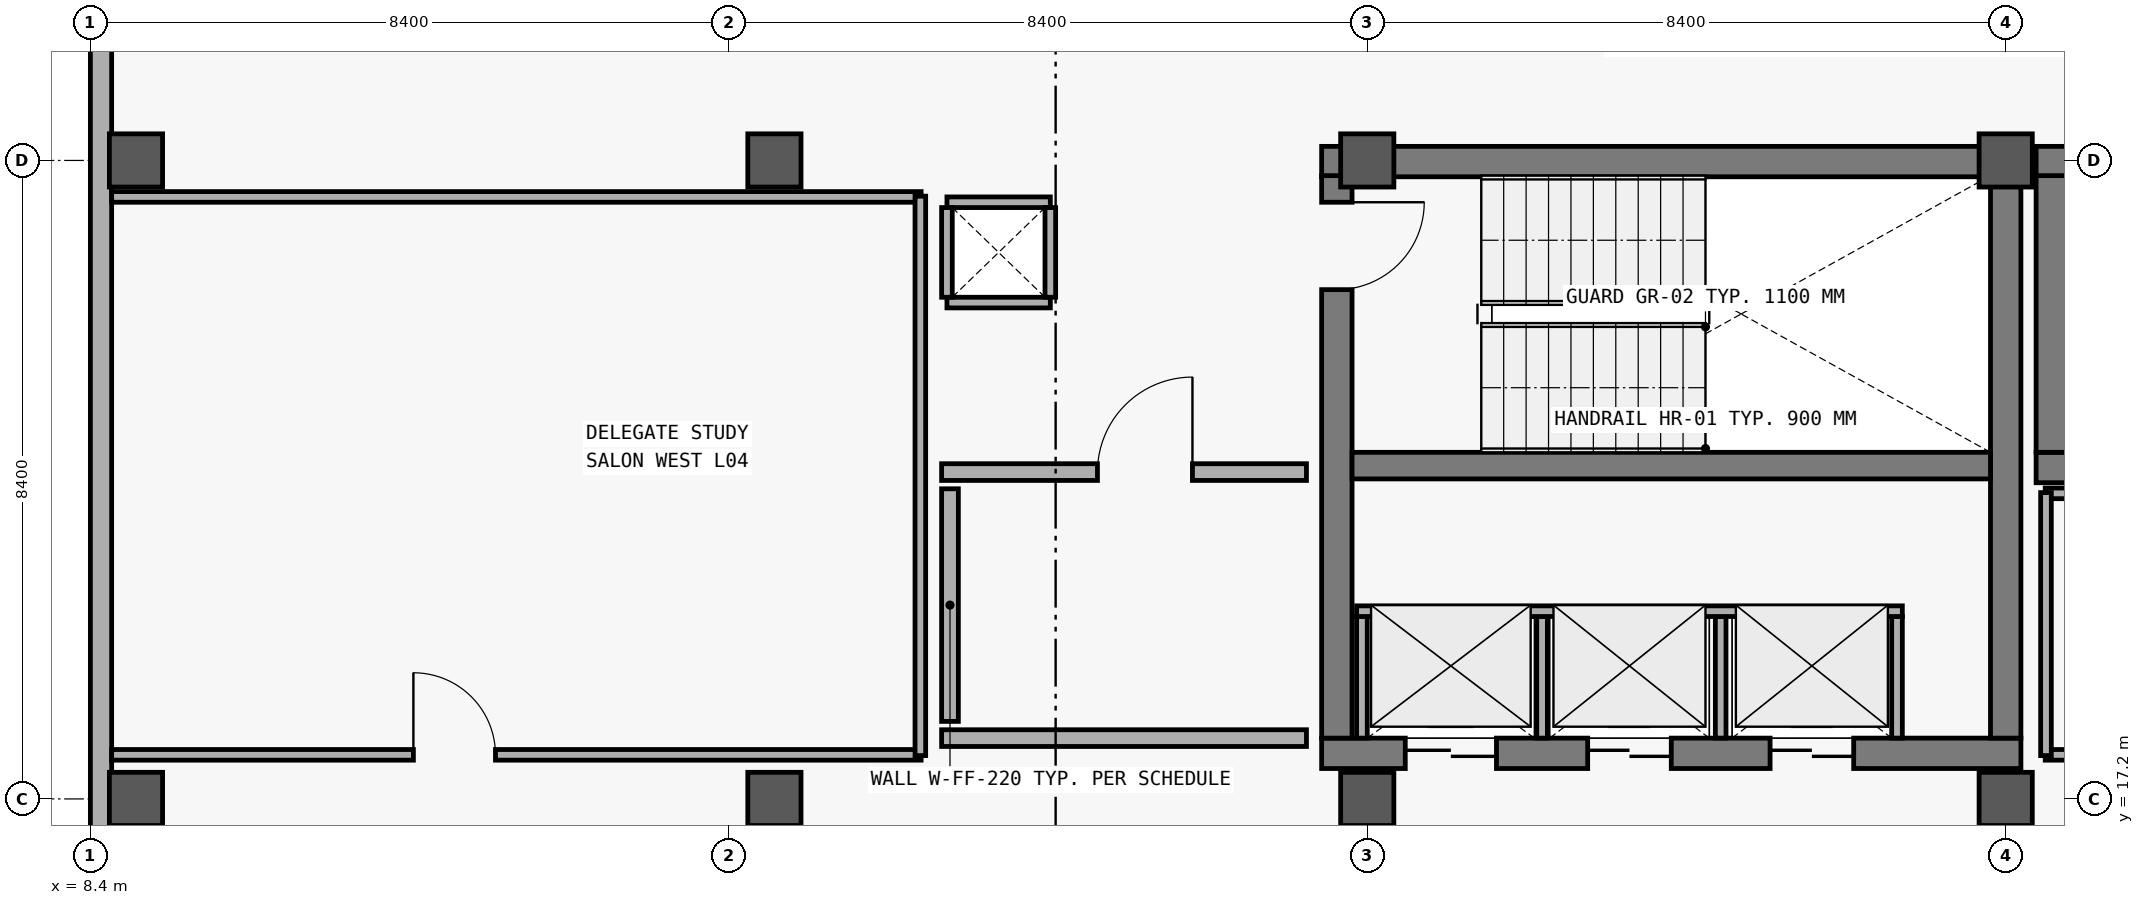
"""IFC4 building model, lengths in metres.
Left out: names, types, materials, properties, quantities, classifications, styles, units other than length and angle.
Written with IfcOpenShell. Run it as: python <this file> out.ifc"""

import sys

from ifc_helpers import new_model, si_unit, direction, frame, frame_2d, origin, origin_2d, place, context, subcontext, project, spatial, rectangle, extrude, element, fill, save


model = new_model("IFC4")
c1 = context("Model", 3, precision=1e-05, world=origin(), true_north=direction((0.0, 1.0)))
c2 = subcontext(c1, "Body", "Model", "MODEL_VIEW")
j1 = project(units=[si_unit("LENGTHUNIT", "METRE"), si_unit("PLANEANGLEUNIT", "RADIAN")], contexts=[c1])
p1 = place(None, origin())
s1 = spatial("IfcSite", under=j1, at=p1, CompositionType="ELEMENT")
p2 = place(p1, origin())
s2 = spatial("IfcBuilding", under=s1, at=p2, CompositionType="ELEMENT")
p3 = place(p2, frame((0.0, 0.0, 19.2)))
s3 = spatial("IfcBuildingStorey", under=s2, at=p3, CompositionType="ELEMENT", Elevation=19.2)
for number, where, z_axis, x_axis in (
    (1, (9.0, 17.2, 0.0), (0.0, 0.0, 1.0), (1.0, 0.0, 0.0)),
    (2, (9.0, 25.6, 0.0), (0.0, 0.0, 1.0), (1.0, 0.0, 0.0)),
    (3, (17.4, 17.2, 0.0), (0.0, 0.0, 1.0), (1.0, 0.0, 0.0)),
    (4, (17.4, 25.6, 0.0), (0.0, 0.0, 1.0), (1.0, 0.0, 0.0)),
    (5, (25.2, 17.2, 0.0), (0.0, 0.0, 1.0), (1.0, 0.0, 0.0)),
    (6, (25.2, 25.6, 0.0), (0.0, 0.0, 1.0), (1.0, 0.0, 0.0)),
    (7, (33.6, 17.2, 0.0), (0.0, 0.0, 1.0), (1.0, 0.0, 0.0)),
    (8, (33.6, 25.6, 0.0), (0.0, 0.0, 1.0), (1.0, 0.0, 0.0)),
):
    element("IfcColumn", number, at=place(p3, frame(where, z_axis=z_axis, x_axis=x_axis)), inside=s3, PredefinedType="COLUMN", context=c2, shape_type="SweptSolid", body=[
        extrude(rectangle(XDim=0.7, YDim=0.7, at=origin_2d()), origin(), (0.0, 0.0, 1.0), 3.6),
    ])
p4 = place(p3, frame((8.54, 6.0, 0.0), z_axis=(0.0, 0.0, 1.0), x_axis=(0.0, 1.0, 0.0)))
e9 = element("IfcWall", 9, at=p4, inside=s3, PredefinedType="SOLIDWALL", context=c2, shape_type="SweptSolid", body=[
    extrude(rectangle(XDim=28.0, YDim=0.28, at=frame_2d((14.0, 0.0))), origin(), (0.0, 0.0, 1.0), 3.32),
])
p5 = place(p4, frame((4.5, 0.0, 0.95)))
e10 = element("IfcOpeningElement", 10, at=p5, cuts=e9, PredefinedType="OPENING", context=c2, shape_type="SweptSolid", body=[
    extrude(rectangle(XDim=1.6, YDim=1.6, at=frame_2d((0.8, 0.8))), frame((0.0, 0.15, 0.0), z_axis=(0.0, -1.0, 0.0), x_axis=(1.0, 0.0, 0.0)), (0.0, 0.0, 1.0), 0.3),
])
p6 = place(p3, frame((24.6, 17.8, 0.0), z_axis=(0.0, 0.0, 1.0), x_axis=(1.0, 0.0, 0.0)))
e11 = element("IfcWall", 11, at=p6, inside=s3, PredefinedType="SHEAR", context=c2, shape_type="SweptSolid", body=[
    extrude(rectangle(XDim=9.2, YDim=0.4, at=frame_2d((4.6, 0.0))), origin(), (0.0, 0.0, 1.0), 3.32),
])
p7 = place(p6, frame((1.1, 0.0, 0.0)))
e12 = element("IfcOpeningElement", 12, at=p7, cuts=e11, PredefinedType="OPENING", context=c2, shape_type="SweptSolid", body=[
    extrude(rectangle(XDim=1.2, YDim=2.2, at=frame_2d((0.6, 1.1))), frame((0.0, 0.21, 0.0), z_axis=(0.0, -1.0, 0.0), x_axis=(1.0, 0.0, 0.0)), (0.0, 0.0, 1.0), 0.42),
])
p8 = place(p6, frame((3.5, 0.0, 0.0)))
e13 = element("IfcOpeningElement", 13, at=p8, cuts=e11, PredefinedType="OPENING", context=c2, shape_type="SweptSolid", body=[
    extrude(rectangle(XDim=1.1, YDim=2.2, at=frame_2d((0.55, 1.1))), frame((0.0, 0.21, 0.0), z_axis=(0.0, -1.0, 0.0), x_axis=(1.0, 0.0, 0.0)), (0.0, 0.0, 1.0), 0.42),
])
p9 = place(p6, frame((5.9, 0.0, 0.0)))
e14 = element("IfcOpeningElement", 14, at=p9, cuts=e11, PredefinedType="OPENING", context=c2, shape_type="SweptSolid", body=[
    extrude(rectangle(XDim=1.1, YDim=2.2, at=frame_2d((0.55, 1.1))), frame((0.0, 0.21, 0.0), z_axis=(0.0, -1.0, 0.0), x_axis=(1.0, 0.0, 0.0)), (0.0, 0.0, 1.0), 0.42),
])
p10 = place(p3, frame((33.8, 25.585, 0.0), z_axis=(0.0, 0.0, 1.0), x_axis=(-1.0, 0.0, 0.0)))
e15 = element("IfcWall", 15, at=p10, inside=s3, PredefinedType="SHEAR", context=c2, shape_type="SweptSolid", body=[
    extrude(rectangle(XDim=9.2, YDim=0.4, at=frame_2d((4.6, 0.0))), origin(), (0.0, 0.0, 1.0), 3.32),
])
p11 = place(p3, frame((24.8, 25.4, 0.0), z_axis=(0.0, 0.0, 1.0), x_axis=(0.0, -1.0, 0.0)))
e16 = element("IfcWall", 16, at=p11, inside=s3, PredefinedType="SHEAR", context=c2, shape_type="SweptSolid", body=[
    extrude(rectangle(XDim=7.4, YDim=0.4, at=frame_2d((3.7, 0.0))), origin(), (0.0, 0.0, 1.0), 3.32),
])
p12 = place(p11, frame((0.35, 0.0, 0.0)))
e17 = element("IfcOpeningElement", 17, at=p12, cuts=e16, PredefinedType="OPENING", context=c2, shape_type="SweptSolid", body=[
    extrude(rectangle(XDim=1.15, YDim=2.2, at=frame_2d((0.575, 1.1))), frame((0.0, 0.21, 0.0), z_axis=(0.0, -1.0, 0.0), x_axis=(1.0, 0.0, 0.0)), (0.0, 0.0, 1.0), 0.42),
])
p13 = place(p3, frame((33.6, 18.0, 0.0), z_axis=(0.0, 0.0, 1.0), x_axis=(0.0, 1.0, 0.0)))
e18 = element("IfcWall", 18, at=p13, inside=s3, PredefinedType="SHEAR", context=c2, shape_type="SweptSolid", body=[
    extrude(rectangle(XDim=7.4, YDim=0.4, at=frame_2d((3.7, 0.0))), origin(), (0.0, 0.0, 1.0), 3.32),
])
p14 = place(p3, frame((25.0, 21.585, 0.0), z_axis=(0.0, 0.0, 1.0), x_axis=(1.0, 0.0, 0.0)))
e19 = element("IfcWall", 19, at=p14, inside=s3, PredefinedType="SHEAR", context=c2, shape_type="SweptSolid", body=[
    extrude(rectangle(XDim=8.4, YDim=0.35, at=frame_2d((4.2, 0.0))), origin(), (0.0, 0.0, 1.0), 3.32),
])
for number, where, z_axis, x_axis in (
    (20, (25.13, 18.0, 0.0), (0.0, 0.0, 1.0), (0.0, 1.0, 0.0)),
    (21, (27.5, 18.0, 0.0), (0.0, 0.0, 1.0), (0.0, 1.0, 0.0)),
    (22, (29.85, 18.0, 0.0), (0.0, 0.0, 1.0), (0.0, 1.0, 0.0)),
    (23, (32.17, 18.0, 0.0), (0.0, 0.0, 1.0), (0.0, 1.0, 0.0)),
):
    element("IfcWall", number, at=place(p3, frame(where, z_axis=z_axis, x_axis=x_axis)), inside=s3, PredefinedType="PARTITIONING", context=c2, shape_type="SweptSolid", body=[
        extrude(rectangle(XDim=1.6, YDim=0.14, at=frame_2d((0.8, 0.0))), origin(), (0.0, 0.0, 1.0), 2.47),
    ])
p15 = place(p3, frame((25.06, 19.67, 0.0), z_axis=(0.0, 0.0, 1.0), x_axis=(1.0, 0.0, 0.0)))
e24 = element("IfcWall", 24, at=p15, inside=s3, PredefinedType="PARTITIONING", context=c2, shape_type="SweptSolid", body=[
    extrude(rectangle(XDim=7.18, YDim=0.14, at=frame_2d((3.59, 0.0))), origin(), (0.0, 0.0, 1.0), 2.47),
])
p16 = place(p3, frame((19.6, 18.0, 0.0), z_axis=(0.0, 0.0, 1.0), x_axis=(1.0, 0.0, 0.0)))
e25 = element("IfcWall", 25, at=p16, inside=s3, PredefinedType="SOLIDWALL", context=c2, shape_type="SweptSolid", body=[
    extrude(rectangle(XDim=4.8, YDim=0.22, at=frame_2d((2.4, 0.0))), origin(), (0.0, 0.0, 1.0), 2.47),
])
p17 = place(p3, frame((19.6, 21.5, 0.0), z_axis=(0.0, 0.0, 1.0), x_axis=(1.0, 0.0, 0.0)))
e26 = element("IfcWall", 26, at=p17, inside=s3, PredefinedType="SOLIDWALL", context=c2, shape_type="SweptSolid", body=[
    extrude(rectangle(XDim=4.8, YDim=0.22, at=frame_2d((2.4, 0.0))), origin(), (0.0, 0.0, 1.0), 2.47),
])
p18 = place(p17, frame((2.05, 0.0, 0.0)))
e27 = element("IfcOpeningElement", 27, at=p18, cuts=e26, PredefinedType="OPENING", context=c2, shape_type="SweptSolid", body=[
    extrude(rectangle(XDim=1.25, YDim=2.2, at=frame_2d((0.625, 1.1))), frame((0.0, 0.12, 0.0), z_axis=(0.0, -1.0, 0.0), x_axis=(1.0, 0.0, 0.0)), (0.0, 0.0, 1.0), 0.24),
])
p19 = place(p3, frame((19.71, 18.22, 0.0), z_axis=(0.0, 0.0, 1.0), x_axis=(0.0, 1.0, 0.0)))
e28 = element("IfcWall", 28, at=p19, inside=s3, PredefinedType="SOLIDWALL", context=c2, shape_type="SweptSolid", body=[
    extrude(rectangle(XDim=3.06, YDim=0.22, at=frame_2d((1.53, 0.0))), origin(), (0.0, 0.0, 1.0), 2.47),
])
for number, where, z_axis, x_axis in (
    (29, (34.0, 21.56, 0.0), (0.0, 0.0, 1.0), (1.0, 0.0, 0.0)),
    (30, (43.1, 25.585, 0.0), (0.0, 0.0, 1.0), (-1.0, 0.0, 0.0)),
):
    element("IfcWall", number, at=place(p3, frame(where, z_axis=z_axis, x_axis=x_axis)), inside=s3, PredefinedType="SHEAR", context=c2, shape_type="SweptSolid", body=[
        extrude(rectangle(XDim=9.1, YDim=0.4, at=frame_2d((4.55, 0.0))), origin(), (0.0, 0.0, 1.0), 3.32),
    ])
p20 = place(p3, frame((34.2, 25.4, 0.0), z_axis=(0.0, 0.0, 1.0), x_axis=(0.0, -1.0, 0.0)))
e31 = element("IfcWall", 31, at=p20, inside=s3, PredefinedType="SHEAR", context=c2, shape_type="SweptSolid", body=[
    extrude(rectangle(XDim=3.64, YDim=0.4, at=frame_2d((1.82, 0.0))), origin(), (0.0, 0.0, 1.0), 3.32),
])
p21 = place(p3, frame((8.68, 17.78, 0.0), z_axis=(0.0, 0.0, 1.0), x_axis=(1.0, 0.0, 0.0)))
e32 = element("IfcWall", 32, at=p21, inside=s3, PredefinedType="PARTITIONING", context=c2, shape_type="SweptSolid", body=[
    extrude(rectangle(XDim=10.65, YDim=0.14, at=frame_2d((5.325, 0.0))), origin(), (0.0, 0.0, 1.0), 2.48),
])
p22 = place(p21, frame((3.97, 0.0, 0.0)))
e33 = element("IfcOpeningElement", 33, at=p22, cuts=e32, PredefinedType="OPENING", context=c2, shape_type="SweptSolid", body=[
    extrude(rectangle(XDim=1.08, YDim=2.25, at=frame_2d((0.54, 1.125))), frame((0.0, 0.08, 0.0), z_axis=(0.0, -1.0, 0.0), x_axis=(1.0, 0.0, 0.0)), (0.0, 0.0, 1.0), 0.16),
])
for number, where, z_axis, x_axis in (
    (34, (34.12, 17.78, 0.0), (0.0, 0.0, 1.0), (1.0, 0.0, 0.0)),
    (35, (34.12, 21.22, 0.0), (0.0, 0.0, 1.0), (1.0, 0.0, 0.0)),
):
    element("IfcWall", number, at=place(p3, frame(where, z_axis=z_axis, x_axis=x_axis)), inside=s3, PredefinedType="PARTITIONING", context=c2, shape_type="SweptSolid", body=[
        extrude(rectangle(XDim=10.76, YDim=0.14, at=frame_2d((5.38, 0.0))), origin(), (0.0, 0.0, 1.0), 2.48),
    ])
p23 = place(p3, frame((34.13, 17.77, 0.0), z_axis=(0.0, 0.0, 1.0), x_axis=(0.0, 1.0, 0.0)))
e36 = element("IfcWall", 36, at=p23, inside=s3, PredefinedType="PARTITIONING", context=c2, shape_type="SweptSolid", body=[
    extrude(rectangle(XDim=3.46, YDim=0.14, at=frame_2d((1.73, 0.0))), origin(), (0.0, 0.0, 1.0), 2.48),
])
p24 = place(p3, frame((8.68, 25.12, 0.0), z_axis=(0.0, 0.0, 1.0), x_axis=(1.0, 0.0, 0.0)))
e37 = element("IfcWall", 37, at=p24, inside=s3, PredefinedType="PARTITIONING", context=c2, shape_type="SweptSolid", body=[
    extrude(rectangle(XDim=10.65, YDim=0.14, at=frame_2d((5.325, 0.0))), origin(), (0.0, 0.0, 1.0), 2.48),
])
p25 = place(p3, frame((19.32, 17.77, 0.0), z_axis=(0.0, 0.0, 1.0), x_axis=(0.0, 1.0, 0.0)))
e38 = element("IfcWall", 38, at=p25, inside=s3, PredefinedType="PARTITIONING", context=c2, shape_type="SweptSolid", body=[
    extrude(rectangle(XDim=7.36, YDim=0.14, at=frame_2d((3.68, 0.0))), origin(), (0.0, 0.0, 1.0), 2.48),
])
for number, where, z_axis, x_axis in (
    (39, (19.67, 23.73, 0.0), (0.0, 0.0, 1.0), (1.0, 0.0, 0.0)),
    (40, (21.03, 25.05, 0.0), (0.0, 0.0, 1.0), (-1.0, 0.0, 0.0)),
):
    element("IfcWall", number, at=place(p3, frame(where, z_axis=z_axis, x_axis=x_axis)), inside=s3, PredefinedType="PARTITIONING", context=c2, shape_type="SweptSolid", body=[
        extrude(rectangle(XDim=1.36, YDim=0.14, at=frame_2d((0.68, 0.0))), origin(), (0.0, 0.0, 1.0), 2.44),
    ])
for number, where, z_axis, x_axis in (
    (41, (19.67, 24.98, 0.0), (0.0, 0.0, 1.0), (0.0, -1.0, 0.0)),
    (42, (21.03, 23.8, 0.0), (0.0, 0.0, 1.0), (0.0, 1.0, 0.0)),
):
    element("IfcWall", number, at=place(p3, frame(where, z_axis=z_axis, x_axis=x_axis)), inside=s3, PredefinedType="PARTITIONING", context=c2, shape_type="SweptSolid", body=[
        extrude(rectangle(XDim=1.18, YDim=0.14, at=frame_2d((0.59, 0.0))), origin(), (0.0, 0.0, 1.0), 2.44),
    ])
p26 = place(p12, origin())
e43 = element("IfcDoor", 43, at=p26, inside=s3, OperationType="SINGLE_SWING_LEFT", PredefinedType="DOOR", context=c2, shape_type="SweptSolid", body=[
    extrude(rectangle(XDim=1.15, YDim=2.2, at=frame_2d((0.575, 1.1))), frame((0.0, 0.025, 0.0), z_axis=(0.0, -1.0, 0.0), x_axis=(1.0, 0.0, 0.0)), (0.0, 0.0, 1.0), 0.05),
])
fill(e17, e43)
p27 = place(p7, origin())
e44 = element("IfcDoor", 44, at=p27, inside=s3, OperationType="DOUBLE_DOOR_SLIDING", PredefinedType="DOOR", context=c2, shape_type="SweptSolid", body=[
    extrude(rectangle(XDim=1.2, YDim=2.2, at=frame_2d((0.6, 1.1))), frame((0.0, 0.025, 0.0), z_axis=(0.0, -1.0, 0.0), x_axis=(1.0, 0.0, 0.0)), (0.0, 0.0, 1.0), 0.05),
])
fill(e12, e44)
p28 = place(p8, origin())
e45 = element("IfcDoor", 45, at=p28, inside=s3, OperationType="DOUBLE_DOOR_SLIDING", PredefinedType="DOOR", context=c2, shape_type="SweptSolid", body=[
    extrude(rectangle(XDim=1.1, YDim=2.2, at=frame_2d((0.55, 1.1))), frame((0.0, 0.025, 0.0), z_axis=(0.0, -1.0, 0.0), x_axis=(1.0, 0.0, 0.0)), (0.0, 0.0, 1.0), 0.05),
])
fill(e13, e45)
p29 = place(p9, origin())
e46 = element("IfcDoor", 46, at=p29, inside=s3, OperationType="DOUBLE_DOOR_SLIDING", PredefinedType="DOOR", context=c2, shape_type="SweptSolid", body=[
    extrude(rectangle(XDim=1.1, YDim=2.2, at=frame_2d((0.55, 1.1))), frame((0.0, 0.025, 0.0), z_axis=(0.0, -1.0, 0.0), x_axis=(1.0, 0.0, 0.0)), (0.0, 0.0, 1.0), 0.05),
])
fill(e14, e46)
p30 = place(p18, origin())
e47 = element("IfcDoor", 47, at=p30, inside=s3, OperationType="SINGLE_SWING_RIGHT", PredefinedType="DOOR", context=c2, shape_type="SweptSolid", body=[
    extrude(rectangle(XDim=1.25, YDim=2.2, at=frame_2d((0.625, 1.1))), frame((0.0, 0.025, 0.0), z_axis=(0.0, -1.0, 0.0), x_axis=(1.0, 0.0, 0.0)), (0.0, 0.0, 1.0), 0.05),
])
fill(e27, e47)
p31 = place(p22, origin())
e48 = element("IfcDoor", 48, at=p31, inside=s3, OperationType="SINGLE_SWING_LEFT", PredefinedType="DOOR", context=c2, shape_type="SweptSolid", body=[
    extrude(rectangle(XDim=1.08, YDim=2.25, at=frame_2d((0.54, 1.125))), frame((0.0, 0.025, 0.0), z_axis=(0.0, -1.0, 0.0), x_axis=(1.0, 0.0, 0.0)), (0.0, 0.0, 1.0), 0.05),
])
fill(e33, e48)
save(model, sys.argv[1])
